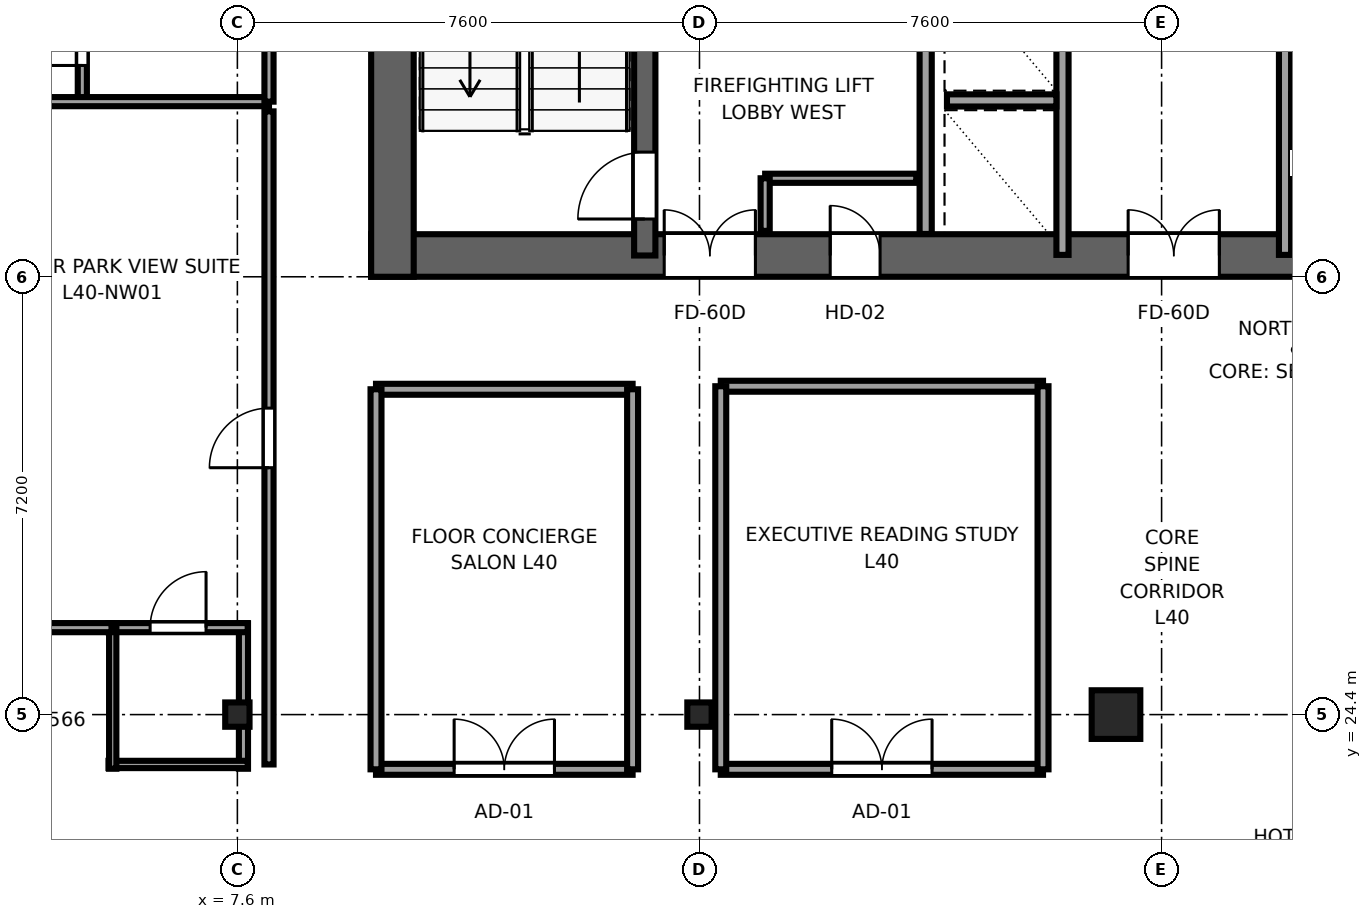
"""IFC4 building model, lengths in metres.
Left out: names, types, materials, properties, quantities, classifications, styles, units other than length and angle.
Written with IfcOpenShell. Run it as: python <this file> out.ifc"""

import sys

from ifc_helpers import new_model, si_unit, direction, frame, frame_2d, origin, origin_2d, place, context, subcontext, project, spatial, rectangle, i_section, extrude, source, transform, mapped, element, fill, save


model = new_model("IFC4")
c1 = context("Model", 3, precision=1e-05, world=origin(), true_north=direction((0.0, 1.0)))
c2 = subcontext(c1, "Body", "Model", "MODEL_VIEW")
j1 = project(units=[si_unit("LENGTHUNIT", "METRE"), si_unit("PLANEANGLEUNIT", "RADIAN")], contexts=[c1])
p1 = place(None, origin())
s1 = spatial("IfcSite", under=j1, at=p1, CompositionType="ELEMENT")
p2 = place(p1, origin())
s2 = spatial("IfcBuilding", under=s1, at=p2, CompositionType="ELEMENT")
p3 = place(p2, frame((0.0, 0.0, 154.15)))
s3 = spatial("IfcBuildingStorey", under=s2, at=p3, CompositionType="ELEMENT", Elevation=154.15)
p4 = place(p3, frame((9.8, 31.95, 0.0), z_axis=(0.0, 0.0, 1.0), x_axis=(1.0, 0.0, 0.0)))
e1 = element("IfcWall", 1, at=p4, inside=s3, PredefinedType="SHEAR", context=c2, shape_type="SweptSolid", body=[
    extrude(rectangle(XDim=26.4, YDim=0.7, at=frame_2d((13.2, 0.0))), origin(), (0.0, 0.0, 1.0), 3.55),
])
p5 = place(p4, frame((6.32, 0.0, 0.0), z_axis=(0.0, 0.0, 1.0), x_axis=(-1.0, 0.0, 0.0)))
e2 = element("IfcOpeningElement", 2, at=p5, cuts=e1, PredefinedType="OPENING", context=c2, shape_type="SweptSolid", body=[
    extrude(rectangle(XDim=1.5, YDim=2.04, at=frame_2d((0.75, 1.02))), frame((0.0, 0.36, 0.0), z_axis=(0.0, -1.0, 0.0), x_axis=(1.0, 0.0, 0.0)), (0.0, 0.0, 1.0), 0.72),
])
p6 = place(p4, frame((13.95, 0.0, 0.0), z_axis=(0.0, 0.0, 1.0), x_axis=(-1.0, 0.0, 0.0)))
e3 = element("IfcOpeningElement", 3, at=p6, cuts=e1, PredefinedType="OPENING", context=c2, shape_type="SweptSolid", body=[
    extrude(rectangle(XDim=1.5, YDim=2.04, at=frame_2d((0.75, 1.02))), frame((0.0, 0.36, 0.0), z_axis=(0.0, -1.0, 0.0), x_axis=(1.0, 0.0, 0.0)), (0.0, 0.0, 1.0), 0.72),
])
p7 = place(p4, frame((20.25, 0.0, 0.0), z_axis=(0.0, 0.0, 1.0), x_axis=(-1.0, 0.0, 0.0)))
e4 = element("IfcOpeningElement", 4, at=p7, cuts=e1, PredefinedType="OPENING", context=c2, shape_type="SweptSolid", body=[
    extrude(rectangle(XDim=1.5, YDim=2.04, at=frame_2d((0.75, 1.02))), frame((0.0, 0.36, 0.0), z_axis=(0.0, -1.0, 0.0), x_axis=(1.0, 0.0, 0.0)), (0.0, 0.0, 1.0), 0.72),
])
p8 = place(p4, frame((8.37, 0.0, 0.0), z_axis=(0.0, 0.0, 1.0), x_axis=(-1.0, 0.0, 0.0)))
e5 = element("IfcOpeningElement", 5, at=p8, cuts=e1, PredefinedType="OPENING", context=c2, shape_type="SweptSolid", body=[
    extrude(rectangle(XDim=0.82, YDim=2.01, at=frame_2d((0.41, 1.005))), frame((0.0, 0.36, 0.0), z_axis=(0.0, -1.0, 0.0), x_axis=(1.0, 0.0, 0.0)), (0.0, 0.0, 1.0), 0.72),
])
p9 = place(p3, frame((10.15, 31.6, 0.0), z_axis=(0.0, 0.0, 1.0), x_axis=(0.0, 1.0, 0.0)))
e6 = element("IfcWall", 6, at=p9, inside=s3, PredefinedType="SHEAR", context=c2, shape_type="SweptSolid", body=[
    extrude(rectangle(XDim=13.6, YDim=0.7, at=frame_2d((6.8, 0.0))), origin(), (0.0, 0.0, 1.0), 3.55),
])
p10 = place(p3, frame((14.3, 31.95, 0.0), z_axis=(0.0, 0.0, 1.0), x_axis=(0.0, 1.0, 0.0)))
e7 = element("IfcWall", 7, at=p10, inside=s3, PredefinedType="SHEAR", context=c2, shape_type="SweptSolid", body=[
    extrude(rectangle(XDim=12.9, YDim=0.35, at=frame_2d((6.45, 0.0))), origin(), (0.0, 0.0, 1.0), 3.55),
])
p11 = place(p10, frame((0.6, 0.0, 0.0)))
e8 = element("IfcOpeningElement", 8, at=p11, cuts=e7, PredefinedType="OPENING", context=c2, shape_type="SweptSolid", body=[
    extrude(rectangle(XDim=1.1, YDim=2.12, at=frame_2d((0.55, 1.06))), frame((0.0, 0.185, 0.0), z_axis=(0.0, -1.0, 0.0), x_axis=(1.0, 0.0, 0.0)), (0.0, 0.0, 1.0), 0.37),
])
m1 = source(origin(), c2, "Body", "SweptSolid", [
    extrude(i_section(OverallWidth=0.4, OverallDepth=0.4, WebThickness=0.02, FlangeThickness=0.035, at=origin_2d()), origin(), (0.0, 0.0, 1.0), 3.55),
])
for number, where, z_axis, x_axis in (
    (9, (7.6, 24.4, 0.0), (0.0, 0.0, 1.0), (1.0, 0.0, 0.0)),
    (10, (15.2, 24.4, 0.0), (0.0, 0.0, 1.0), (1.0, 0.0, 0.0)),
):
    element("IfcColumn", number, at=place(p3, frame(where, z_axis=z_axis, x_axis=x_axis)), inside=s3, PredefinedType="COLUMN", context=c2, shape_type="MappedRepresentation", body=[
        mapped(m1, transform((0.0, 0.0, 0.0), x_axis=(1.0, 0.0, 0.0), y_axis=(0.0, 1.0, 0.0), z_axis=(0.0, 0.0, 1.0), scale=1.0)),
    ])
m2 = source(origin(), c2, "Body", "SweptSolid", [
    extrude(rectangle(XDim=0.8, YDim=0.8, at=origin_2d()), origin(), (0.0, 0.0, 1.0), 3.55),
])
p12 = place(p3, frame((22.05, 24.4, 0.0), z_axis=(0.0, 0.0, 1.0), x_axis=(1.0, 0.0, 0.0)))
e11 = element("IfcColumn", 11, at=p12, inside=s3, PredefinedType="COLUMN", context=c2, shape_type="MappedRepresentation", body=[
    mapped(m2, transform((0.0, 0.0, 0.0), x_axis=(1.0, 0.0, 0.0), y_axis=(0.0, 1.0, 0.0), z_axis=(0.0, 0.0, 1.0), scale=1.0)),
])
p13 = place(p3, frame((18.92, 32.304, 0.0), z_axis=(0.0, 0.0, 1.0), x_axis=(0.0, 1.0, 0.0)))
e12 = element("IfcWall", 12, at=p13, inside=s3, PredefinedType="SOLIDWALL", context=c2, shape_type="SweptSolid", body=[
    extrude(rectangle(XDim=3.846, YDim=0.2, at=frame_2d((1.923, 0.0))), origin(), (0.0, 0.0, 1.0), 3.37),
])
p14 = place(p3, frame((21.17, 31.96, 0.0), z_axis=(0.0, 0.0, 1.0), x_axis=(0.0, 1.0, 0.0)))
e13 = element("IfcWall", 13, at=p14, inside=s3, PredefinedType="SOLIDWALL", context=c2, shape_type="SweptSolid", body=[
    extrude(rectangle(XDim=12.58, YDim=0.2, at=frame_2d((6.29, 0.0))), origin(), (0.0, 0.0, 1.0), 3.37),
])
p15 = place(p14, frame((5.74, 0.0, 0.0)))
e14 = element("IfcOpeningElement", 14, at=p15, cuts=e13, PredefinedType="OPENING", context=c2, shape_type="SweptSolid", body=[
    extrude(rectangle(XDim=1.1, YDim=2.12, at=frame_2d((0.55, 1.06))), frame((0.0, 0.11, 0.0), z_axis=(0.0, -1.0, 0.0), x_axis=(1.0, 0.0, 0.0)), (0.0, 0.0, 1.0), 0.22),
])
p16 = place(p14, frame((8.24, 0.0, 0.0)))
e15 = element("IfcOpeningElement", 15, at=p16, cuts=e13, PredefinedType="OPENING", context=c2, shape_type="SweptSolid", body=[
    extrude(rectangle(XDim=1.1, YDim=2.12, at=frame_2d((0.55, 1.06))), frame((0.0, 0.11, 0.0), z_axis=(0.0, -1.0, 0.0), x_axis=(1.0, 0.0, 0.0)), (0.0, 0.0, 1.0), 0.22),
])
p17 = place(p3, frame((19.27, 34.5, 0.0), z_axis=(0.0, 0.0, 1.0), x_axis=(1.0, 0.0, 0.0)))
e16 = element("IfcWall", 16, at=p17, inside=s3, PredefinedType="SOLIDWALL", context=c2, shape_type="SweptSolid", body=[
    extrude(rectangle(XDim=1.8, YDim=0.2, at=frame_2d((0.9, 0.0))), origin(), (0.0, 0.0, 1.0), 3.37),
])
p18 = place(p3, frame((24.83, 31.96, 0.0), z_axis=(0.0, 0.0, 1.0), x_axis=(0.0, 1.0, 0.0)))
e17 = element("IfcWall", 17, at=p18, inside=s3, PredefinedType="SOLIDWALL", context=c2, shape_type="SweptSolid", body=[
    extrude(rectangle(XDim=12.58, YDim=0.2, at=frame_2d((6.29, 0.0))), origin(), (0.0, 0.0, 1.0), 3.37),
])
p19 = place(p18, frame((5.74, 0.0, 0.0)))
e18 = element("IfcOpeningElement", 18, at=p19, cuts=e17, PredefinedType="OPENING", context=c2, shape_type="SweptSolid", body=[
    extrude(rectangle(XDim=1.1, YDim=2.12, at=frame_2d((0.55, 1.06))), frame((0.0, 0.11, 0.0), z_axis=(0.0, -1.0, 0.0), x_axis=(1.0, 0.0, 0.0)), (0.0, 0.0, 1.0), 0.22),
])
p20 = place(p18, frame((8.24, 0.0, 0.0)))
e19 = element("IfcOpeningElement", 19, at=p20, cuts=e17, PredefinedType="OPENING", context=c2, shape_type="SweptSolid", body=[
    extrude(rectangle(XDim=1.1, YDim=2.12, at=frame_2d((0.55, 1.06))), frame((0.0, 0.11, 0.0), z_axis=(0.0, -1.0, 0.0), x_axis=(1.0, 0.0, 0.0)), (0.0, 0.0, 1.0), 0.22),
])
p21 = place(p3, frame((24.93, 34.5, 0.0), z_axis=(0.0, 0.0, 1.0), x_axis=(1.0, 0.0, 0.0)))
e20 = element("IfcWall", 20, at=p21, inside=s3, PredefinedType="SOLIDWALL", context=c2, shape_type="SweptSolid", body=[
    extrude(rectangle(XDim=1.8, YDim=0.2, at=frame_2d((0.9, 0.0))), origin(), (0.0, 0.0, 1.0), 3.37),
])
p22 = place(p3, frame((7.7, 23.51, 0.0), z_axis=(0.0, 0.0, 1.0), x_axis=(0.0, 1.0, 0.0)))
e21 = element("IfcWall", 21, at=p22, inside=s3, PredefinedType="PARTITIONING", context=c2, shape_type="SweptSolid", body=[
    extrude(rectangle(XDim=2.39, YDim=0.15, at=frame_2d((1.195, 0.0))), origin(), (0.0, 0.0, 1.0), 2.16),
])
p23 = place(p3, frame((5.48, 23.58, 0.0), z_axis=(0.0, 0.0, 1.0), x_axis=(1.0, 0.0, 0.0)))
e22 = element("IfcWall", 22, at=p23, inside=s3, PredefinedType="PLUMBINGWALL", context=c2, shape_type="SweptSolid", body=[
    extrude(rectangle(XDim=2.29, YDim=0.12, at=frame_2d((1.145, 0.0))), origin(), (0.0, 0.0, 1.0), 3.37),
])
p24 = place(p3, frame((5.48, 25.83, 0.0), z_axis=(0.0, 0.0, 1.0), x_axis=(1.0, 0.0, 0.0)))
e23 = element("IfcWall", 23, at=p24, inside=s3, PredefinedType="PARTITIONING", context=c2, shape_type="SweptSolid", body=[
    extrude(rectangle(XDim=2.29, YDim=0.15, at=frame_2d((1.145, 0.0))), origin(), (0.0, 0.0, 1.0), 3.37),
])
p25 = place(p24, frame((0.685, 0.0, 0.0)))
e24 = element("IfcOpeningElement", 24, at=p25, cuts=e23, PredefinedType="OPENING", context=c2, shape_type="SweptSolid", body=[
    extrude(rectangle(XDim=0.92, YDim=2.01, at=frame_2d((0.46, 1.005))), frame((0.0, 0.085, 0.0), z_axis=(0.0, -1.0, 0.0), x_axis=(1.0, 0.0, 0.0)), (0.0, 0.0, 1.0), 0.17),
])
p26 = place(p3, frame((5.55, 23.51, 0.0), z_axis=(0.0, 0.0, 1.0), x_axis=(0.0, 1.0, 0.0)))
e25 = element("IfcWall", 25, at=p26, inside=s3, PredefinedType="PLUMBINGWALL", context=c2, shape_type="SweptSolid", body=[
    extrude(rectangle(XDim=2.39, YDim=0.12, at=frame_2d((1.195, 0.0))), origin(), (0.0, 0.0, 1.0), 3.37),
])
p27 = place(p3, frame((5.05, 34.41, 0.0), z_axis=(0.0, 0.0, 1.0), x_axis=(0.0, 1.0, 0.0)))
e26 = element("IfcWall", 26, at=p27, inside=s3, PredefinedType="PARTITIONING", context=c2, shape_type="SweptSolid", body=[
    extrude(rectangle(XDim=2.39, YDim=0.15, at=frame_2d((1.195, 0.0))), origin(), (0.0, 0.0, 1.0), 3.37),
])
p28 = place(p27, frame((0.665, 0.0, 0.0)))
e27 = element("IfcOpeningElement", 27, at=p28, cuts=e26, PredefinedType="OPENING", context=c2, shape_type="SweptSolid", body=[
    extrude(rectangle(XDim=0.92, YDim=2.01, at=frame_2d((0.46, 1.005))), frame((0.0, 0.085, 0.0), z_axis=(0.0, -1.0, 0.0), x_axis=(1.0, 0.0, 0.0)), (0.0, 0.0, 1.0), 0.17),
])
p29 = place(p3, frame((2.83, 34.48, 0.0), z_axis=(0.0, 0.0, 1.0), x_axis=(1.0, 0.0, 0.0)))
e28 = element("IfcWall", 28, at=p29, inside=s3, PredefinedType="PARTITIONING", context=c2, shape_type="SweptSolid", body=[
    extrude(rectangle(XDim=5.29, YDim=0.15, at=frame_2d((2.645, 0.0))), origin(), (0.0, 0.0, 1.0), 3.37),
])
p30 = place(p3, frame((16.28, 33.22, 0.0), z_axis=(0.0, 0.0, 1.0), x_axis=(1.0, 0.0, 0.0)))
e29 = element("IfcWall", 29, at=p30, inside=s3, PredefinedType="PARTITIONING", context=c2, shape_type="SweptSolid", body=[
    extrude(rectangle(XDim=2.485, YDim=0.15, at=frame_2d((1.242, 0.0))), origin(), (0.0, 0.0, 1.0), 3.37),
])
p31 = place(p3, frame((16.28, 32.355, 0.0), z_axis=(0.0, 0.0, 1.0), x_axis=(0.0, 1.0, 0.0)))
e30 = element("IfcWall", 30, at=p31, inside=s3, PredefinedType="PARTITIONING", context=c2, shape_type="SweptSolid", body=[
    extrude(rectangle(XDim=0.865, YDim=0.15, at=frame_2d((0.433, 0.0))), origin(), (0.0, 0.0, 1.0), 3.37),
])
p32 = place(p3, frame((8.12, 23.58, 0.0), z_axis=(0.0, 0.0, 1.0), x_axis=(0.0, 1.0, 0.0)))
e31 = element("IfcWall", 31, at=p32, inside=s3, PredefinedType="PARTITIONING", context=c2, shape_type="SweptSolid", body=[
    extrude(rectangle(XDim=10.74, YDim=0.15, at=frame_2d((5.37, 0.0))), origin(), (0.0, 0.0, 1.0), 3.37),
])
p33 = place(p32, frame((4.88, 0.0, 0.0)))
e32 = element("IfcOpeningElement", 32, at=p33, cuts=e31, PredefinedType="OPENING", context=c2, shape_type="SweptSolid", body=[
    extrude(rectangle(XDim=0.98, YDim=2.12, at=frame_2d((0.49, 1.06))), frame((0.0, 0.085, 0.0), z_axis=(0.0, -1.0, 0.0), x_axis=(1.0, 0.0, 0.0)), (0.0, 0.0, 1.0), 0.17),
])
p34 = place(p3, frame((2.9, 25.83, 0.0), z_axis=(0.0, 0.0, 1.0), x_axis=(1.0, 0.0, 0.0)))
e33 = element("IfcWall", 33, at=p34, inside=s3, PredefinedType="PARTITIONING", context=c2, shape_type="SweptSolid", body=[
    extrude(rectangle(XDim=2.63, YDim=0.15, at=frame_2d((1.315, 0.0))), origin(), (0.0, 0.0, 1.0), 3.37),
])
p35 = place(p3, frame((8.12, 34.48, 0.0), z_axis=(0.0, 0.0, 1.0), x_axis=(0.0, 1.0, 0.0)))
e34 = element("IfcWall", 34, at=p35, inside=s3, PredefinedType="PARTITIONING", context=c2, shape_type="SweptSolid", body=[
    extrude(rectangle(XDim=11.115, YDim=0.15, at=frame_2d((5.558, 0.0))), origin(), (0.0, 0.0, 1.0), 3.37),
])
p36 = place(p35, frame((4.32, 0.0, 0.0)))
e35 = element("IfcOpeningElement", 35, at=p36, cuts=e34, PredefinedType="OPENING", context=c2, shape_type="SweptSolid", body=[
    extrude(rectangle(XDim=0.98, YDim=2.12, at=frame_2d((0.49, 1.06))), frame((0.0, 0.085, 0.0), z_axis=(0.0, -1.0, 0.0), x_axis=(1.0, 0.0, 0.0)), (0.0, 0.0, 1.0), 0.17),
])
p37 = place(p3, frame((9.88, 23.5, 0.0), z_axis=(0.0, 0.0, 1.0), x_axis=(1.0, 0.0, 0.0)))
e36 = element("IfcWall", 36, at=p37, inside=s3, PredefinedType="PARTITIONING", context=c2, shape_type="SweptSolid", body=[
    extrude(rectangle(XDim=4.22, YDim=0.18, at=frame_2d((2.11, 0.0))), origin(), (0.0, 0.0, 1.0), 3.37),
])
p38 = place(p37, frame((1.285, 0.0, 0.0)))
e37 = element("IfcOpeningElement", 37, at=p38, cuts=e36, PredefinedType="OPENING", context=c2, shape_type="SweptSolid", body=[
    extrude(rectangle(XDim=1.65, YDim=2.15, at=frame_2d((0.825, 1.075))), frame((0.0, 0.1, 0.0), z_axis=(0.0, -1.0, 0.0), x_axis=(1.0, 0.0, 0.0)), (0.0, 0.0, 1.0), 0.2),
])
p39 = place(p3, frame((9.88, 29.75, 0.0), z_axis=(0.0, 0.0, 1.0), x_axis=(1.0, 0.0, 0.0)))
e38 = element("IfcWall", 38, at=p39, inside=s3, PredefinedType="PARTITIONING", context=c2, shape_type="SweptSolid", body=[
    extrude(rectangle(XDim=4.22, YDim=0.18, at=frame_2d((2.11, 0.0))), origin(), (0.0, 0.0, 1.0), 3.37),
])
for number, where, z_axis, x_axis in (
    (39, (9.88, 23.5, 0.0), (0.0, 0.0, 1.0), (0.0, 1.0, 0.0)),
    (40, (14.1, 23.5, 0.0), (0.0, 0.0, 1.0), (0.0, 1.0, 0.0)),
):
    element("IfcWall", number, at=place(p3, frame(where, z_axis=z_axis, x_axis=x_axis)), inside=s3, PredefinedType="PARTITIONING", context=c2, shape_type="SweptSolid", body=[
        extrude(rectangle(XDim=6.25, YDim=0.18, at=frame_2d((3.125, 0.0))), origin(), (0.0, 0.0, 1.0), 3.37),
    ])
p40 = place(p3, frame((15.55, 23.5, 0.0), z_axis=(0.0, 0.0, 1.0), x_axis=(1.0, 0.0, 0.0)))
e41 = element("IfcWall", 41, at=p40, inside=s3, PredefinedType="PARTITIONING", context=c2, shape_type="SweptSolid", body=[
    extrude(rectangle(XDim=5.3, YDim=0.18, at=frame_2d((2.65, 0.0))), origin(), (0.0, 0.0, 1.0), 3.37),
])
p41 = place(p40, frame((1.825, 0.0, 0.0)))
e42 = element("IfcOpeningElement", 42, at=p41, cuts=e41, PredefinedType="OPENING", context=c2, shape_type="SweptSolid", body=[
    extrude(rectangle(XDim=1.65, YDim=2.15, at=frame_2d((0.825, 1.075))), frame((0.0, 0.1, 0.0), z_axis=(0.0, -1.0, 0.0), x_axis=(1.0, 0.0, 0.0)), (0.0, 0.0, 1.0), 0.2),
])
p42 = place(p3, frame((15.55, 29.8, 0.0), z_axis=(0.0, 0.0, 1.0), x_axis=(1.0, 0.0, 0.0)))
e43 = element("IfcWall", 43, at=p42, inside=s3, PredefinedType="PARTITIONING", context=c2, shape_type="SweptSolid", body=[
    extrude(rectangle(XDim=5.3, YDim=0.18, at=frame_2d((2.65, 0.0))), origin(), (0.0, 0.0, 1.0), 3.37),
])
for number, where, z_axis, x_axis in (
    (44, (15.55, 23.5, 0.0), (0.0, 0.0, 1.0), (0.0, 1.0, 0.0)),
    (45, (20.85, 23.5, 0.0), (0.0, 0.0, 1.0), (0.0, 1.0, 0.0)),
):
    element("IfcWall", number, at=place(p3, frame(where, z_axis=z_axis, x_axis=x_axis)), inside=s3, PredefinedType="PARTITIONING", context=c2, shape_type="SweptSolid", body=[
        extrude(rectangle(XDim=6.3, YDim=0.18, at=frame_2d((3.15, 0.0))), origin(), (0.0, 0.0, 1.0), 3.37),
    ])
m3 = source(origin(), c2, "Body", "SweptSolid", [
    extrude(rectangle(XDim=1.1, YDim=2.12, at=frame_2d((0.55, 1.06))), frame((0.0, 0.025, 0.0), z_axis=(0.0, -1.0, 0.0), x_axis=(1.0, 0.0, 0.0)), (0.0, 0.0, 1.0), 0.05),
])
p43 = place(p11, origin())
e46 = element("IfcDoor", 46, at=p43, inside=s3, OperationType="SINGLE_SWING_LEFT", PredefinedType="DOOR", context=c2, shape_type="MappedRepresentation", body=[
    mapped(m3, transform((0.0, 0.0, 0.0), x_axis=(1.0, 0.0, 0.0), y_axis=(0.0, 1.0, 0.0), z_axis=(0.0, 0.0, 1.0), scale=1.0)),
])
fill(e8, e46)
m4 = source(origin(), c2, "Body", "SweptSolid", [
    extrude(rectangle(XDim=1.5, YDim=2.04, at=frame_2d((0.75, 1.02))), frame((0.0, 0.025, 0.0), z_axis=(0.0, -1.0, 0.0), x_axis=(1.0, 0.0, 0.0)), (0.0, 0.0, 1.0), 0.05),
])
p44 = place(p5, origin())
e47 = element("IfcDoor", 47, at=p44, inside=s3, OperationType="DOUBLE_DOOR_SINGLE_SWING", PredefinedType="DOOR", context=c2, shape_type="MappedRepresentation", body=[
    mapped(m4, transform((0.0, 0.0, 0.0), x_axis=(1.0, 0.0, 0.0), y_axis=(0.0, 1.0, 0.0), z_axis=(0.0, 0.0, 1.0), scale=1.0)),
])
fill(e2, e47)
p45 = place(p6, origin())
e48 = element("IfcDoor", 48, at=p45, inside=s3, OperationType="DOUBLE_DOOR_SINGLE_SWING", PredefinedType="DOOR", context=c2, shape_type="MappedRepresentation", body=[
    mapped(m4, transform((0.0, 0.0, 0.0), x_axis=(1.0, 0.0, 0.0), y_axis=(0.0, 1.0, 0.0), z_axis=(0.0, 0.0, 1.0), scale=1.0)),
])
fill(e3, e48)
m5 = source(origin(), c2, "Body", "SweptSolid", [
    extrude(rectangle(XDim=0.82, YDim=2.01, at=frame_2d((0.41, 1.005))), frame((0.0, 0.025, 0.0), z_axis=(0.0, -1.0, 0.0), x_axis=(1.0, 0.0, 0.0)), (0.0, 0.0, 1.0), 0.05),
])
p46 = place(p8, origin())
e49 = element("IfcDoor", 49, at=p46, inside=s3, OperationType="SINGLE_SWING_LEFT", PredefinedType="DOOR", context=c2, shape_type="MappedRepresentation", body=[
    mapped(m5, transform((0.0, 0.0, 0.0), x_axis=(1.0, 0.0, 0.0), y_axis=(0.0, 1.0, 0.0), z_axis=(0.0, 0.0, 1.0), scale=1.0)),
])
fill(e5, e49)
m6 = source(origin(), c2, "Body", "SweptSolid", [
    extrude(rectangle(XDim=0.92, YDim=2.01, at=frame_2d((0.46, 1.005))), frame((0.0, 0.025, 0.0), z_axis=(0.0, -1.0, 0.0), x_axis=(1.0, 0.0, 0.0)), (0.0, 0.0, 1.0), 0.05),
])
p47 = place(p25, origin())
e50 = element("IfcDoor", 50, at=p47, inside=s3, OperationType="SINGLE_SWING_RIGHT", PredefinedType="DOOR", context=c2, shape_type="MappedRepresentation", body=[
    mapped(m6, transform((0.0, 0.0, 0.0), x_axis=(1.0, 0.0, 0.0), y_axis=(0.0, 1.0, 0.0), z_axis=(0.0, 0.0, 1.0), scale=1.0)),
])
fill(e24, e50)
p48 = place(p28, origin())
e51 = element("IfcDoor", 51, at=p48, inside=s3, OperationType="SINGLE_SWING_LEFT", PredefinedType="DOOR", context=c2, shape_type="MappedRepresentation", body=[
    mapped(m6, transform((0.0, 0.0, 0.0), x_axis=(1.0, 0.0, 0.0), y_axis=(0.0, 1.0, 0.0), z_axis=(0.0, 0.0, 1.0), scale=1.0)),
])
fill(e27, e51)
m7 = source(origin(), c2, "Body", "SweptSolid", [
    extrude(rectangle(XDim=0.98, YDim=2.12, at=frame_2d((0.49, 1.06))), frame((0.0, 0.025, 0.0), z_axis=(0.0, -1.0, 0.0), x_axis=(1.0, 0.0, 0.0)), (0.0, 0.0, 1.0), 0.05),
])
p49 = place(p33, origin())
e52 = element("IfcDoor", 52, at=p49, inside=s3, OperationType="SINGLE_SWING_LEFT", PredefinedType="DOOR", context=c2, shape_type="MappedRepresentation", body=[
    mapped(m7, transform((0.0, 0.0, 0.0), x_axis=(1.0, 0.0, 0.0), y_axis=(0.0, 1.0, 0.0), z_axis=(0.0, 0.0, 1.0), scale=1.0)),
])
fill(e32, e52)
m8 = source(origin(), c2, "Body", "SweptSolid", [
    extrude(rectangle(XDim=1.65, YDim=2.15, at=frame_2d((0.825, 1.075))), frame((0.0, 0.025, 0.0), z_axis=(0.0, -1.0, 0.0), x_axis=(1.0, 0.0, 0.0)), (0.0, 0.0, 1.0), 0.05),
])
p50 = place(p38, origin())
e53 = element("IfcDoor", 53, at=p50, inside=s3, OperationType="DOUBLE_DOOR_SINGLE_SWING", PredefinedType="DOOR", context=c2, shape_type="MappedRepresentation", body=[
    mapped(m8, transform((0.0, 0.0, 0.0), x_axis=(1.0, 0.0, 0.0), y_axis=(0.0, 1.0, 0.0), z_axis=(0.0, 0.0, 1.0), scale=1.0)),
])
fill(e37, e53)
p51 = place(p41, origin())
e54 = element("IfcDoor", 54, at=p51, inside=s3, OperationType="DOUBLE_DOOR_SINGLE_SWING", PredefinedType="DOOR", context=c2, shape_type="MappedRepresentation", body=[
    mapped(m8, transform((0.0, 0.0, 0.0), x_axis=(1.0, 0.0, 0.0), y_axis=(0.0, 1.0, 0.0), z_axis=(0.0, 0.0, 1.0), scale=1.0)),
])
fill(e42, e54)
save(model, sys.argv[1])
